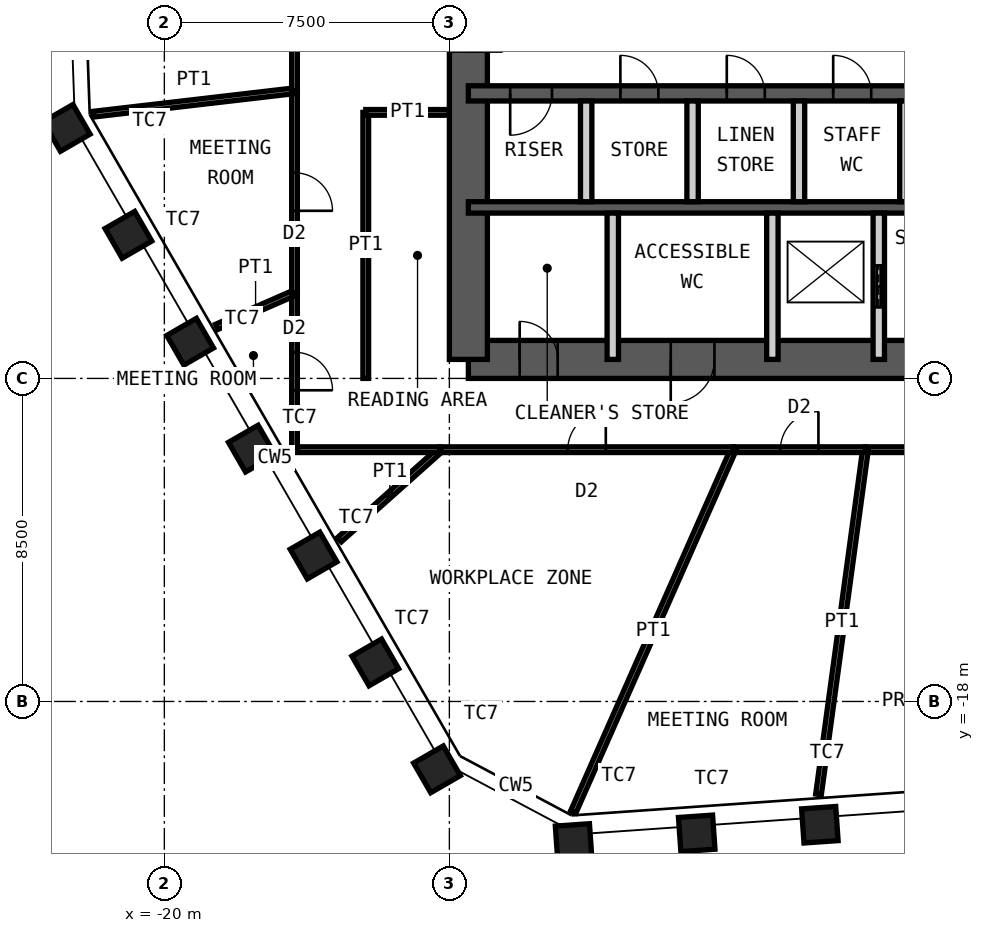
"""IFC4 building model, lengths in metres.
Left out: names, types, materials, properties, quantities, classifications, styles, units other than length and angle.
Written with IfcOpenShell. Run it as: python <this file> out.ifc"""

import sys

from ifc_helpers import new_model, si_unit, direction, frame, frame_2d, origin, origin_2d, place, context, subcontext, project, spatial, rectangle, hollow_rectangle, extrude, element, fill, save


model = new_model("IFC4")
c1 = context("Model", 3, precision=1e-05, world=origin(), true_north=direction((0.0, 1.0)))
c2 = subcontext(c1, "Body", "Model", "MODEL_VIEW")
j1 = project(units=[si_unit("LENGTHUNIT", "METRE"), si_unit("PLANEANGLEUNIT", "RADIAN")], contexts=[c1])
p1 = place(None, origin())
s1 = spatial("IfcSite", under=j1, at=p1, CompositionType="ELEMENT")
p2 = place(p1, origin())
s2 = spatial("IfcBuilding", under=s1, at=p2, CompositionType="ELEMENT")
p3 = place(p2, frame((0.0, 0.0, 278.8)))
s3 = spatial("IfcBuildingStorey", under=s2, at=p3, CompositionType="ELEMENT", Elevation=278.8)
for number, where, z_axis, x_axis in (
    (1, (-2.751, -21.244, 0.0), (0.0, 0.0, 1.0), (0.998, 0.07, 0.0)),
    (2, (-5.991, -21.47, 0.0), (0.0, 0.0, 1.0), (0.998, 0.07, 0.0)),
    (3, (-9.231, -21.697, 0.0), (0.0, 0.0, 1.0), (0.998, 0.07, 0.0)),
    (4, (-12.825, -19.786, 0.0), (0.0, 0.0, 1.0), (0.5, -0.866, 0.0)),
    (5, (-14.449, -16.973, 0.0), (0.0, 0.0, 1.0), (0.5, -0.866, 0.0)),
    (6, (-16.073, -14.16, 0.0), (0.0, 0.0, 1.0), (0.5, -0.866, 0.0)),
    (7, (-17.698, -11.347, 0.0), (0.0, 0.0, 1.0), (0.5, -0.866, 0.0)),
    (8, (-19.322, -8.534, 0.0), (0.0, 0.0, 1.0), (0.5, -0.866, 0.0)),
    (9, (-20.946, -5.721, 0.0), (0.0, 0.0, 1.0), (0.5, -0.866, 0.0)),
    (10, (-22.57, -2.908, 0.0), (0.0, 0.0, 1.0), (0.5, -0.866, 0.0)),
):
    element("IfcColumn", number, at=place(p3, frame(where, z_axis=z_axis, x_axis=x_axis)), inside=s3, PredefinedType="COLUMN", context=c2, shape_type="SweptSolid", body=[
        extrude(hollow_rectangle(XDim=0.9, YDim=0.9, WallThickness=0.06, at=origin_2d()), origin(), (0.0, 0.0, 1.0), 4.2),
    ])
p4 = place(p3, frame((-12.0, -9.0, 0.0), z_axis=(0.0, 0.0, 1.0), x_axis=(1.0, 0.0, 0.0)))
e11 = element("IfcWall", 11, at=p4, inside=s3, PredefinedType="SHEAR", context=c2, shape_type="SweptSolid", body=[
    extrude(rectangle(XDim=24.0, YDim=1.0, at=frame_2d((12.0, 0.0))), origin(), (0.0, 0.0, 1.0), 4.2),
])
p5 = place(p4, frame((1.35, 0.0, 0.0)))
e12 = element("IfcOpeningElement", 12, at=p5, cuts=e11, PredefinedType="OPENING", context=c2, shape_type="SweptSolid", body=[
    extrude(rectangle(XDim=1.0, YDim=2.1, at=frame_2d((0.5, 1.05))), frame((0.0, 0.51, 0.0), z_axis=(0.0, -1.0, 0.0), x_axis=(1.0, 0.0, 0.0)), (0.0, 0.0, 1.0), 1.02),
])
p6 = place(p4, frame((5.325, 0.0, 0.0)))
e13 = element("IfcOpeningElement", 13, at=p6, cuts=e11, PredefinedType="OPENING", context=c2, shape_type="SweptSolid", body=[
    extrude(rectangle(XDim=1.15, YDim=2.1, at=frame_2d((0.575, 1.05))), frame((0.0, 0.51, 0.0), z_axis=(0.0, -1.0, 0.0), x_axis=(1.0, 0.0, 0.0)), (0.0, 0.0, 1.0), 1.02),
])
p7 = place(p4, frame((12.6, 0.0, 0.0)))
e14 = element("IfcOpeningElement", 14, at=p7, cuts=e11, PredefinedType="OPENING", context=c2, shape_type="SweptSolid", body=[
    extrude(rectangle(XDim=1.0, YDim=2.1, at=frame_2d((0.5, 1.05))), frame((0.0, 0.51, 0.0), z_axis=(0.0, -1.0, 0.0), x_axis=(1.0, 0.0, 0.0)), (0.0, 0.0, 1.0), 1.02),
])
p8 = place(p3, frame((-12.0, -9.0, 0.0), z_axis=(0.0, 0.0, 1.0), x_axis=(0.0, 1.0, 0.0)))
e15 = element("IfcWall", 15, at=p8, inside=s3, PredefinedType="SHEAR", context=c2, shape_type="SweptSolid", body=[
    extrude(rectangle(XDim=18.0, YDim=1.0, at=frame_2d((9.0, 0.0))), origin(), (0.0, 0.0, 1.0), 4.2),
])
p9 = place(p8, frame((8.1, 0.0, 0.0)))
e16 = element("IfcOpeningElement", 16, at=p9, cuts=e15, PredefinedType="OPENING", context=c2, shape_type="SweptSolid", body=[
    extrude(rectangle(XDim=1.8, YDim=2.1, at=frame_2d((0.9, 1.05))), frame((0.0, 0.51, 0.0), z_axis=(0.0, -1.0, 0.0), x_axis=(1.0, 0.0, 0.0)), (0.0, 0.0, 1.0), 1.02),
])
p10 = place(p3, frame((-12.0, -2.0, 0.0), z_axis=(0.0, 0.0, 1.0), x_axis=(1.0, 0.0, 0.0)))
e17 = element("IfcWall", 17, at=p10, inside=s3, PredefinedType="SHEAR", context=c2, shape_type="SweptSolid", body=[
    extrude(rectangle(XDim=24.0, YDim=0.4, at=frame_2d((12.0, 0.0))), origin(), (0.0, 0.0, 1.0), 4.2),
])
p11 = place(p10, frame((1.1, 0.0, 0.0)))
e18 = element("IfcOpeningElement", 18, at=p11, cuts=e17, PredefinedType="OPENING", context=c2, shape_type="SweptSolid", body=[
    extrude(rectangle(XDim=1.1, YDim=2.1, at=frame_2d((0.55, 1.05))), frame((0.0, 0.21, 0.0), z_axis=(0.0, -1.0, 0.0), x_axis=(1.0, 0.0, 0.0)), (0.0, 0.0, 1.0), 0.42),
])
p12 = place(p10, frame((13.55, 0.0, 0.0)))
e19 = element("IfcOpeningElement", 19, at=p12, cuts=e17, PredefinedType="OPENING", context=c2, shape_type="SweptSolid", body=[
    extrude(rectangle(XDim=1.1, YDim=2.1, at=frame_2d((0.55, 1.05))), frame((0.0, 0.21, 0.0), z_axis=(0.0, -1.0, 0.0), x_axis=(1.0, 0.0, 0.0)), (0.0, 0.0, 1.0), 0.42),
])
p13 = place(p10, frame((20.7, 0.0, 0.0)))
e20 = element("IfcOpeningElement", 20, at=p13, cuts=e17, PredefinedType="OPENING", context=c2, shape_type="SweptSolid", body=[
    extrude(rectangle(XDim=1.1, YDim=2.1, at=frame_2d((0.55, 1.05))), frame((0.0, 0.21, 0.0), z_axis=(0.0, -1.0, 0.0), x_axis=(1.0, 0.0, 0.0)), (0.0, 0.0, 1.0), 0.42),
])
p14 = place(p10, frame((4.0, 0.0, 0.0)))
e21 = element("IfcOpeningElement", 21, at=p14, cuts=e17, PredefinedType="OPENING", context=c2, shape_type="SweptSolid", body=[
    extrude(rectangle(XDim=1.0, YDim=2.1, at=frame_2d((0.5, 1.05))), frame((0.0, 0.21, 0.0), z_axis=(0.0, -1.0, 0.0), x_axis=(1.0, 0.0, 0.0)), (0.0, 0.0, 1.0), 0.42),
])
p15 = place(p10, frame((6.8, 0.0, 0.0)))
e22 = element("IfcOpeningElement", 22, at=p15, cuts=e17, PredefinedType="OPENING", context=c2, shape_type="SweptSolid", body=[
    extrude(rectangle(XDim=1.0, YDim=2.1, at=frame_2d((0.5, 1.05))), frame((0.0, 0.21, 0.0), z_axis=(0.0, -1.0, 0.0), x_axis=(1.0, 0.0, 0.0)), (0.0, 0.0, 1.0), 0.42),
])
p16 = place(p10, frame((9.6, 0.0, 0.0)))
e23 = element("IfcOpeningElement", 23, at=p16, cuts=e17, PredefinedType="OPENING", context=c2, shape_type="SweptSolid", body=[
    extrude(rectangle(XDim=1.0, YDim=2.1, at=frame_2d((0.5, 1.05))), frame((0.0, 0.21, 0.0), z_axis=(0.0, -1.0, 0.0), x_axis=(1.0, 0.0, 0.0)), (0.0, 0.0, 1.0), 0.42),
])
p17 = place(p3, frame((-12.0, -5.0, 0.0), z_axis=(0.0, 0.0, 1.0), x_axis=(1.0, 0.0, 0.0)))
e24 = element("IfcWall", 24, at=p17, inside=s3, PredefinedType="SHEAR", context=c2, shape_type="SweptSolid", body=[
    extrude(rectangle(XDim=24.0, YDim=0.3, at=frame_2d((12.0, 0.0))), origin(), (0.0, 0.0, 1.0), 4.2),
])
for number, where, z_axis, x_axis in (
    (25, (-8.9, -4.85, 0.0), (0.0, 0.0, 1.0), (0.0, 1.0, 0.0)),
    (26, (-6.1, -4.85, 0.0), (0.0, 0.0, 1.0), (0.0, 1.0, 0.0)),
    (27, (-3.3, -4.85, 0.0), (0.0, 0.0, 1.0), (0.0, 1.0, 0.0)),
    (28, (-0.5, -4.85, 0.0), (0.0, 0.0, 1.0), (0.0, 1.0, 0.0)),
):
    element("IfcWall", number, at=place(p3, frame(where, z_axis=z_axis, x_axis=x_axis)), inside=s3, PredefinedType="PARTITIONING", context=c2, shape_type="SweptSolid", body=[
        extrude(rectangle(XDim=2.65, YDim=0.3, at=frame_2d((1.325, 0.0))), origin(), (0.0, 0.0, 1.0), 3.98),
    ])
for number, where, z_axis, x_axis in (
    (29, (-8.2, -9.0, 0.0), (0.0, 0.0, 1.0), (0.0, 1.0, 0.0)),
    (30, (-4.0, -9.0, 0.0), (0.0, 0.0, 1.0), (0.0, 1.0, 0.0)),
):
    element("IfcWall", number, at=place(p3, frame(where, z_axis=z_axis, x_axis=x_axis)), inside=s3, PredefinedType="PARTITIONING", context=c2, shape_type="SweptSolid", body=[
        extrude(rectangle(XDim=3.85, YDim=0.3, at=frame_2d((1.925, 0.0))), origin(), (0.0, 0.0, 1.0), 3.98),
    ])
p18 = place(p3, frame((-1.2, -9.0, 0.0), z_axis=(0.0, 0.0, 1.0), x_axis=(0.0, 1.0, 0.0)))
e31 = element("IfcWall", 31, at=p18, inside=s3, PredefinedType="PARTITIONING", context=c2, shape_type="SweptSolid", body=[
    extrude(rectangle(XDim=3.85, YDim=0.3, at=frame_2d((1.925, 0.0))), origin(), (0.0, 0.0, 1.0), 3.98),
])
p19 = place(p18, frame((1.375, 0.0, 0.0)))
e32 = element("IfcOpeningElement", 32, at=p19, cuts=e31, PredefinedType="OPENING", context=c2, shape_type="SweptSolid", body=[
    extrude(rectangle(XDim=1.1, YDim=2.4, at=frame_2d((0.55, 1.2))), frame((0.0, 0.16, 0.0), z_axis=(0.0, -1.0, 0.0), x_axis=(1.0, 0.0, 0.0)), (0.0, 0.0, 1.0), 0.32),
])
p20 = place(p3, frame((2.083, -11.375, 0.0), z_axis=(0.0, 0.0, 1.0), x_axis=(-1.0, 0.0, 0.0)))
e33 = element("IfcWall", 33, at=p20, inside=s3, PredefinedType="PARTITIONING", context=c2, shape_type="SweptSolid", body=[
    extrude(rectangle(XDim=3.634, YDim=0.15, at=frame_2d((1.817, 0.0))), origin(), (0.0, 0.0, 1.0), 4.03),
])
p21 = place(p20, frame((1.317, 0.0, 0.0)))
e34 = element("IfcOpeningElement", 34, at=p21, cuts=e33, PredefinedType="OPENING", context=c2, shape_type="SweptSolid", body=[
    extrude(rectangle(XDim=1.0, YDim=2.4, at=frame_2d((0.5, 1.2))), frame((0.0, 0.085, 0.0), z_axis=(0.0, -1.0, 0.0), x_axis=(1.0, 0.0, 0.0)), (0.0, 0.0, 1.0), 0.17),
])
p22 = place(p3, frame((-2.786, -20.446, 0.0), z_axis=(0.0, 0.0, 1.0), x_axis=(0.135041803834, 0.99083990191, 0.0)))
e35 = element("IfcWall", 35, at=p22, inside=s3, PredefinedType="PARTITIONING", context=c2, shape_type="SweptSolid", body=[
    extrude(rectangle(XDim=9.155, YDim=0.15, at=frame_2d((4.578, 0.0))), origin(), (0.0, 0.0, 1.0), 3.33),
])
p23 = place(p3, frame((-1.55, -11.375, 0.0), z_axis=(0.0, 0.0, 1.0), x_axis=(-1.0, 0.0, 0.0)))
e36 = element("IfcWall", 36, at=p23, inside=s3, PredefinedType="PARTITIONING", context=c2, shape_type="SweptSolid", body=[
    extrude(rectangle(XDim=3.477, YDim=0.15, at=frame_2d((1.739, 0.0))), origin(), (0.0, 0.0, 1.0), 4.03),
])
p24 = place(p23, frame((1.239, 0.0, 0.0)))
e37 = element("IfcOpeningElement", 37, at=p24, cuts=e36, PredefinedType="OPENING", context=c2, shape_type="SweptSolid", body=[
    extrude(rectangle(XDim=1.0, YDim=2.4, at=frame_2d((0.5, 1.2))), frame((0.0, 0.085, 0.0), z_axis=(0.0, -1.0, 0.0), x_axis=(1.0, 0.0, 0.0)), (0.0, 0.0, 1.0), 0.17),
])
p25 = place(p3, frame((-9.24, -20.907, 0.0), z_axis=(0.0, 0.0, 1.0), x_axis=(0.404231308238, 0.914656793251, 0.0)))
e38 = element("IfcWall", 38, at=p25, inside=s3, PredefinedType="PARTITIONING", context=c2, shape_type="SweptSolid", body=[
    extrude(rectangle(XDim=10.421, YDim=0.15, at=frame_2d((5.211, 0.0))), origin(), (0.0, 0.0, 1.0), 2.93),
])
p26 = place(p3, frame((-5.027, -11.375, 0.0), z_axis=(0.0, 0.0, 1.0), x_axis=(-1.0, 0.0, 0.0)))
e39 = element("IfcWall", 39, at=p26, inside=s3, PredefinedType="PARTITIONING", context=c2, shape_type="SweptSolid", body=[
    extrude(rectangle(XDim=7.713, YDim=0.15, at=frame_2d((3.856, 0.0))), origin(), (0.0, 0.0, 1.0), 4.03),
])
p27 = place(p26, frame((3.356, 0.0, 0.0)))
e40 = element("IfcOpeningElement", 40, at=p27, cuts=e39, PredefinedType="OPENING", context=c2, shape_type="SweptSolid", body=[
    extrude(rectangle(XDim=1.0, YDim=2.4, at=frame_2d((0.5, 1.2))), frame((0.0, 0.085, 0.0), z_axis=(0.0, -1.0, 0.0), x_axis=(1.0, 0.0, 0.0)), (0.0, 0.0, 1.0), 0.17),
])
p28 = place(p3, frame((-15.393, -13.743, 0.0), z_axis=(0.0, 0.0, 1.0), x_axis=(0.745934007174, 0.666019862273, 0.0)))
e41 = element("IfcWall", 41, at=p28, inside=s3, PredefinedType="PARTITIONING", context=c2, shape_type="SweptSolid", body=[
    extrude(rectangle(XDim=3.556, YDim=0.15, at=frame_2d((1.778, 0.0))), origin(), (0.0, 0.0, 1.0), 3.33),
])
p29 = place(p3, frame((-12.74, -11.375, 0.0), z_axis=(0.0, 0.0, 1.0), x_axis=(-1.0, 0.0, 0.0)))
e42 = element("IfcWall", 42, at=p29, inside=s3, PredefinedType="PARTITIONING", context=c2, shape_type="SweptSolid", body=[
    extrude(rectangle(XDim=3.835, YDim=0.15, at=frame_2d((1.917, 0.0))), origin(), (0.0, 0.0, 1.0), 4.03),
])
p30 = place(p3, frame((-16.575, -11.375, 0.0), z_axis=(0.0, 0.0, 1.0), x_axis=(0.0, 1.0, 0.0)))
e43 = element("IfcWall", 43, at=p30, inside=s3, PredefinedType="PARTITIONING", context=c2, shape_type="SweptSolid", body=[
    extrude(rectangle(XDim=4.127, YDim=0.15, at=frame_2d((2.063, 0.0))), origin(), (0.0, 0.0, 1.0), 4.03),
])
p31 = place(p30, frame((1.563, 0.0, 0.0)))
e44 = element("IfcOpeningElement", 44, at=p31, cuts=e43, PredefinedType="OPENING", context=c2, shape_type="SweptSolid", body=[
    extrude(rectangle(XDim=1.0, YDim=2.4, at=frame_2d((0.5, 1.2))), frame((0.0, 0.085, 0.0), z_axis=(0.0, -1.0, 0.0), x_axis=(1.0, 0.0, 0.0)), (0.0, 0.0, 1.0), 0.17),
])
p32 = place(p3, frame((-18.624, -8.144, 0.0), z_axis=(0.0, 0.0, 1.0), x_axis=(0.916199931106, 0.400721457176, 0.0)))
e45 = element("IfcWall", 45, at=p32, inside=s3, PredefinedType="PARTITIONING", context=c2, shape_type="SweptSolid", body=[
    extrude(rectangle(XDim=2.236, YDim=0.15, at=frame_2d((1.118, 0.0))), origin(), (0.0, 0.0, 1.0), 3.33),
])
p33 = place(p3, frame((-16.575, -7.248, 0.0), z_axis=(0.0, 0.0, 1.0), x_axis=(0.0, 1.0, 0.0)))
e46 = element("IfcWall", 46, at=p33, inside=s3, PredefinedType="PARTITIONING", context=c2, shape_type="SweptSolid", body=[
    extrude(rectangle(XDim=5.317, YDim=0.15, at=frame_2d((2.659, 0.0))), origin(), (0.0, 0.0, 1.0), 4.03),
])
p34 = place(p33, frame((2.159, 0.0, 0.0)))
e47 = element("IfcOpeningElement", 47, at=p34, cuts=e46, PredefinedType="OPENING", context=c2, shape_type="SweptSolid", body=[
    extrude(rectangle(XDim=1.0, YDim=2.4, at=frame_2d((0.5, 1.2))), frame((0.0, 0.085, 0.0), z_axis=(0.0, -1.0, 0.0), x_axis=(1.0, 0.0, 0.0)), (0.0, 0.0, 1.0), 0.17),
])
p35 = place(p3, frame((-21.864, -2.547, 0.0), z_axis=(0.0, 0.0, 1.0), x_axis=(0.993286690457, 0.115678652143, 0.0)))
e48 = element("IfcWall", 48, at=p35, inside=s3, PredefinedType="PARTITIONING", context=c2, shape_type="SweptSolid", body=[
    extrude(rectangle(XDim=5.325, YDim=0.15, at=frame_2d((2.662, 0.0))), origin(), (0.0, 0.0, 1.0), 2.93),
])
p36 = place(p3, frame((-16.575, -1.931, 0.0), z_axis=(0.0, 0.0, 1.0), x_axis=(0.0, 1.0, 0.0)))
e49 = element("IfcWall", 49, at=p36, inside=s3, PredefinedType="PARTITIONING", context=c2, shape_type="SweptSolid", body=[
    extrude(rectangle(XDim=11.028, YDim=0.15, at=frame_2d((5.514, 0.0))), origin(), (0.0, 0.0, 1.0), 4.03),
])
p37 = place(p36, frame((4.614, 0.0, 0.0)))
e50 = element("IfcOpeningElement", 50, at=p37, cuts=e49, PredefinedType="OPENING", context=c2, shape_type="SweptSolid", body=[
    extrude(rectangle(XDim=1.8, YDim=2.4, at=frame_2d((0.9, 1.2))), frame((0.0, 0.085, 0.0), z_axis=(0.0, -1.0, 0.0), x_axis=(1.0, 0.0, 0.0)), (0.0, 0.0, 1.0), 0.17),
])
p38 = place(p3, frame((-14.7, -9.5, 0.0), z_axis=(0.0, 0.0, 1.0), x_axis=(0.0, 1.0, 0.0)))
e51 = element("IfcWall", 51, at=p38, inside=s3, PredefinedType="PARTITIONING", context=c2, shape_type="SweptSolid", body=[
    extrude(rectangle(XDim=7.0, YDim=0.15, at=frame_2d((3.5, 0.0))), origin(), (0.0, 0.0, 1.0), 4.03),
])
p39 = place(p3, frame((-12.5, -2.5, 0.0), z_axis=(0.0, 0.0, 1.0), x_axis=(-1.0, 0.0, 0.0)))
e52 = element("IfcWall", 52, at=p39, inside=s3, PredefinedType="PARTITIONING", context=c2, shape_type="SweptSolid", body=[
    extrude(rectangle(XDim=2.2, YDim=0.15, at=frame_2d((1.1, 0.0))), origin(), (0.0, 0.0, 1.0), 3.53),
])
p40 = place(p5, origin())
e53 = element("IfcDoor", 53, at=p40, inside=s3, OperationType="SINGLE_SWING_RIGHT", PredefinedType="DOOR", context=c2, shape_type="SweptSolid", body=[
    extrude(rectangle(XDim=1.0, YDim=2.1, at=frame_2d((0.5, 1.05))), frame((0.0, 0.025, 0.0), z_axis=(0.0, -1.0, 0.0), x_axis=(1.0, 0.0, 0.0)), (0.0, 0.0, 1.0), 0.05),
])
fill(e12, e53)
p41 = place(p6, origin())
e54 = element("IfcDoor", 54, at=p41, inside=s3, OperationType="SINGLE_SWING_LEFT", PredefinedType="DOOR", context=c2, shape_type="SweptSolid", body=[
    extrude(rectangle(XDim=1.15, YDim=2.1, at=frame_2d((0.575, 1.05))), frame((0.0, 0.025, 0.0), z_axis=(0.0, -1.0, 0.0), x_axis=(1.0, 0.0, 0.0)), (0.0, 0.0, 1.0), 0.05),
])
fill(e13, e54)
p42 = place(p11, origin())
e55 = element("IfcDoor", 55, at=p42, inside=s3, OperationType="SINGLE_SWING_LEFT", PredefinedType="DOOR", context=c2, shape_type="SweptSolid", body=[
    extrude(rectangle(XDim=1.1, YDim=2.1, at=frame_2d((0.55, 1.05))), frame((0.0, 0.025, 0.0), z_axis=(0.0, -1.0, 0.0), x_axis=(1.0, 0.0, 0.0)), (0.0, 0.0, 1.0), 0.05),
])
fill(e18, e55)
p43 = place(p19, origin())
e56 = element("IfcDoor", 56, at=p43, inside=s3, OperationType="DOUBLE_DOOR_SLIDING", PredefinedType="DOOR", context=c2, shape_type="SweptSolid", body=[
    extrude(rectangle(XDim=1.1, YDim=2.4, at=frame_2d((0.55, 1.2))), frame((0.0, 0.025, 0.0), z_axis=(0.0, -1.0, 0.0), x_axis=(1.0, 0.0, 0.0)), (0.0, 0.0, 1.0), 0.05),
])
fill(e32, e56)
p44 = place(p14, origin())
e57 = element("IfcDoor", 57, at=p44, inside=s3, OperationType="SINGLE_SWING_RIGHT", PredefinedType="DOOR", context=c2, shape_type="SweptSolid", body=[
    extrude(rectangle(XDim=1.0, YDim=2.1, at=frame_2d((0.5, 1.05))), frame((0.0, 0.025, 0.0), z_axis=(0.0, -1.0, 0.0), x_axis=(1.0, 0.0, 0.0)), (0.0, 0.0, 1.0), 0.05),
])
fill(e21, e57)
p45 = place(p15, origin())
e58 = element("IfcDoor", 58, at=p45, inside=s3, OperationType="SINGLE_SWING_RIGHT", PredefinedType="DOOR", context=c2, shape_type="SweptSolid", body=[
    extrude(rectangle(XDim=1.0, YDim=2.1, at=frame_2d((0.5, 1.05))), frame((0.0, 0.025, 0.0), z_axis=(0.0, -1.0, 0.0), x_axis=(1.0, 0.0, 0.0)), (0.0, 0.0, 1.0), 0.05),
])
fill(e22, e58)
p46 = place(p16, origin())
e59 = element("IfcDoor", 59, at=p46, inside=s3, OperationType="SINGLE_SWING_RIGHT", PredefinedType="DOOR", context=c2, shape_type="SweptSolid", body=[
    extrude(rectangle(XDim=1.0, YDim=2.1, at=frame_2d((0.5, 1.05))), frame((0.0, 0.025, 0.0), z_axis=(0.0, -1.0, 0.0), x_axis=(1.0, 0.0, 0.0)), (0.0, 0.0, 1.0), 0.05),
])
fill(e23, e59)
p47 = place(p24, origin())
e60 = element("IfcDoor", 60, at=p47, inside=s3, OperationType="SINGLE_SWING_LEFT", PredefinedType="DOOR", context=c2, shape_type="SweptSolid", body=[
    extrude(rectangle(XDim=1.0, YDim=2.4, at=frame_2d((0.5, 1.2))), frame((0.0, 0.025, 0.0), z_axis=(0.0, -1.0, 0.0), x_axis=(1.0, 0.0, 0.0)), (0.0, 0.0, 1.0), 0.05),
])
fill(e37, e60)
p48 = place(p27, origin())
e61 = element("IfcDoor", 61, at=p48, inside=s3, OperationType="SINGLE_SWING_LEFT", PredefinedType="DOOR", context=c2, shape_type="SweptSolid", body=[
    extrude(rectangle(XDim=1.0, YDim=2.4, at=frame_2d((0.5, 1.2))), frame((0.0, 0.025, 0.0), z_axis=(0.0, -1.0, 0.0), x_axis=(1.0, 0.0, 0.0)), (0.0, 0.0, 1.0), 0.05),
])
fill(e40, e61)
p49 = place(p31, origin())
e62 = element("IfcDoor", 62, at=p49, inside=s3, OperationType="SINGLE_SWING_LEFT", PredefinedType="DOOR", context=c2, shape_type="SweptSolid", body=[
    extrude(rectangle(XDim=1.0, YDim=2.4, at=frame_2d((0.5, 1.2))), frame((0.0, 0.025, 0.0), z_axis=(0.0, -1.0, 0.0), x_axis=(1.0, 0.0, 0.0)), (0.0, 0.0, 1.0), 0.05),
])
fill(e44, e62)
p50 = place(p34, origin())
e63 = element("IfcDoor", 63, at=p50, inside=s3, OperationType="SINGLE_SWING_LEFT", PredefinedType="DOOR", context=c2, shape_type="SweptSolid", body=[
    extrude(rectangle(XDim=1.0, YDim=2.4, at=frame_2d((0.5, 1.2))), frame((0.0, 0.025, 0.0), z_axis=(0.0, -1.0, 0.0), x_axis=(1.0, 0.0, 0.0)), (0.0, 0.0, 1.0), 0.05),
])
fill(e47, e63)
save(model, sys.argv[1])
